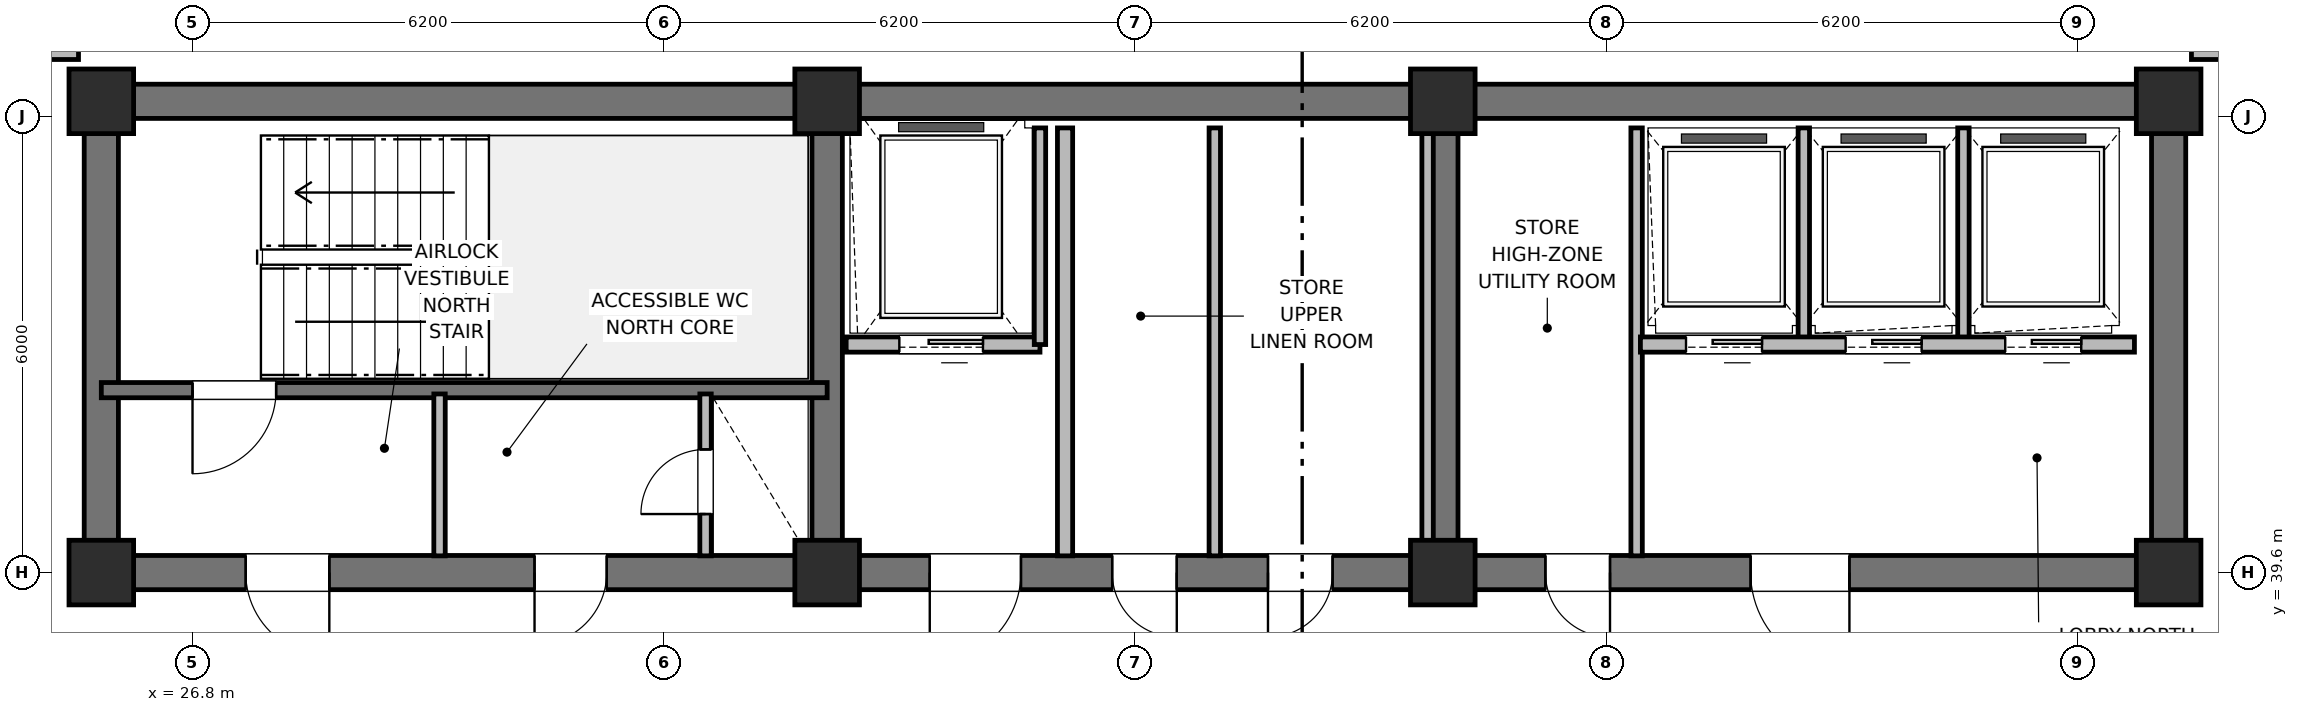
"""IFC4 building model, lengths in metres.
Left out: names, types, materials, properties, quantities, classifications, styles, units other than length and angle.
Written with IfcOpenShell. Run it as: python <this file> out.ifc"""

import sys

from ifc_helpers import new_model, si_unit, direction, frame, frame_2d, origin, origin_2d, place, context, subcontext, project, spatial, rectangle, extrude, element, fill, save


model = new_model("IFC4")
c1 = context("Model", 3, precision=1e-05, world=origin(), true_north=direction((0.0, 1.0)))
c2 = subcontext(c1, "Body", "Model", "MODEL_VIEW")
j1 = project(units=[si_unit("LENGTHUNIT", "METRE"), si_unit("PLANEANGLEUNIT", "RADIAN")], contexts=[c1])
p1 = place(None, origin())
s1 = spatial("IfcSite", under=j1, at=p1, CompositionType="ELEMENT")
p2 = place(p1, origin())
s2 = spatial("IfcBuilding", under=s1, at=p2, CompositionType="ELEMENT")
p3 = place(p2, frame((0.0, 0.0, 225.8)))
s3 = spatial("IfcBuildingStorey", under=s2, at=p3, CompositionType="ELEMENT", Elevation=225.8)
p4 = place(p3, frame((25.6, 45.8, 0.0), z_axis=(0.0, 0.0, 1.0), x_axis=(1.0, 0.0, 0.0)))
e1 = element("IfcWall", 1, at=p4, inside=s3, PredefinedType="SHEAR", context=c2, shape_type="SweptSolid", body=[
    extrude(rectangle(XDim=27.2, YDim=0.45, at=frame_2d((13.6, 0.0))), origin(), (0.0, 0.0, 1.0), 3.7),
])
for number, where, z_axis, x_axis in (
    (2, (25.6, 39.825, 0.0), (0.0, 0.0, 1.0), (0.0, 1.0, 0.0)),
    (3, (52.8, 39.825, 0.0), (0.0, 0.0, 1.0), (0.0, 1.0, 0.0)),
):
    element("IfcWall", number, at=place(p3, frame(where, z_axis=z_axis, x_axis=x_axis)), inside=s3, PredefinedType="SHEAR", context=c2, shape_type="SweptSolid", body=[
        extrude(rectangle(XDim=5.75, YDim=0.45, at=frame_2d((2.875, 0.0))), origin(), (0.0, 0.0, 1.0), 3.7),
    ])
p5 = place(p3, frame((52.8, 39.6, 0.0), z_axis=(0.0, 0.0, 1.0), x_axis=(-1.0, 0.0, 0.0)))
e4 = element("IfcWall", 4, at=p5, inside=s3, PredefinedType="SHEAR", context=c2, shape_type="SweptSolid", body=[
    extrude(rectangle(XDim=27.2, YDim=0.45, at=frame_2d((13.6, 0.0))), origin(), (0.0, 0.0, 1.0), 3.7),
])
p6 = place(p5, frame((24.2, 0.0, 0.0)))
e5 = element("IfcOpeningElement", 5, at=p6, cuts=e4, PredefinedType="OPENING", context=c2, shape_type="SweptSolid", body=[
    extrude(rectangle(XDim=1.1, YDim=2.15, at=frame_2d((0.55, 1.075))), frame((0.0, 0.235, 0.0), z_axis=(0.0, -1.0, 0.0), x_axis=(1.0, 0.0, 0.0)), (0.0, 0.0, 1.0), 0.47),
])
p7 = place(p5, frame((20.55, 0.0, 0.0)))
e6 = element("IfcOpeningElement", 6, at=p7, cuts=e4, PredefinedType="OPENING", context=c2, shape_type="SweptSolid", body=[
    extrude(rectangle(XDim=0.95, YDim=2.1, at=frame_2d((0.475, 1.05))), frame((0.0, 0.235, 0.0), z_axis=(0.0, -1.0, 0.0), x_axis=(1.0, 0.0, 0.0)), (0.0, 0.0, 1.0), 0.47),
])
p8 = place(p5, frame((15.1, 0.0, 0.0)))
e7 = element("IfcOpeningElement", 7, at=p8, cuts=e4, PredefinedType="OPENING", context=c2, shape_type="SweptSolid", body=[
    extrude(rectangle(XDim=1.2, YDim=2.15, at=frame_2d((0.6, 1.075))), frame((0.0, 0.235, 0.0), z_axis=(0.0, -1.0, 0.0), x_axis=(1.0, 0.0, 0.0)), (0.0, 0.0, 1.0), 0.47),
])
p9 = place(p5, frame((13.05, 0.0, 0.0)))
e8 = element("IfcOpeningElement", 8, at=p9, cuts=e4, PredefinedType="OPENING", context=c2, shape_type="SweptSolid", body=[
    extrude(rectangle(XDim=0.85, YDim=2.1, at=frame_2d((0.425, 1.05))), frame((0.0, 0.235, 0.0), z_axis=(0.0, -1.0, 0.0), x_axis=(1.0, 0.0, 0.0)), (0.0, 0.0, 1.0), 0.47),
])
p10 = place(p5, frame((11.0, 0.0, 0.0)))
e9 = element("IfcOpeningElement", 9, at=p10, cuts=e4, PredefinedType="OPENING", context=c2, shape_type="SweptSolid", body=[
    extrude(rectangle(XDim=0.85, YDim=2.1, at=frame_2d((0.425, 1.05))), frame((0.0, 0.235, 0.0), z_axis=(0.0, -1.0, 0.0), x_axis=(1.0, 0.0, 0.0)), (0.0, 0.0, 1.0), 0.47),
])
p11 = place(p5, frame((7.35, 0.0, 0.0)))
e10 = element("IfcOpeningElement", 10, at=p11, cuts=e4, PredefinedType="OPENING", context=c2, shape_type="SweptSolid", body=[
    extrude(rectangle(XDim=0.85, YDim=2.1, at=frame_2d((0.425, 1.05))), frame((0.0, 0.235, 0.0), z_axis=(0.0, -1.0, 0.0), x_axis=(1.0, 0.0, 0.0)), (0.0, 0.0, 1.0), 0.47),
])
p12 = place(p5, frame((4.2, 0.0, 0.0)))
e11 = element("IfcOpeningElement", 11, at=p12, cuts=e4, PredefinedType="OPENING", context=c2, shape_type="SweptSolid", body=[
    extrude(rectangle(XDim=1.3, YDim=2.2, at=frame_2d((0.65, 1.1))), frame((0.0, 0.235, 0.0), z_axis=(0.0, -1.0, 0.0), x_axis=(1.0, 0.0, 0.0)), (0.0, 0.0, 1.0), 0.47),
])
for number, where, z_axis, x_axis in (
    (12, (35.15, 39.825, 0.0), (0.0, 0.0, 1.0), (0.0, 1.0, 0.0)),
    (13, (43.25, 39.825, 0.0), (0.0, 0.0, 1.0), (0.0, 1.0, 0.0)),
):
    element("IfcWall", number, at=place(p3, frame(where, z_axis=z_axis, x_axis=x_axis)), inside=s3, PredefinedType="SHEAR", context=c2, shape_type="SweptSolid", body=[
        extrude(rectangle(XDim=5.75, YDim=0.4, at=frame_2d((2.875, 0.0))), origin(), (0.0, 0.0, 1.0), 3.7),
    ])
for number, where, z_axis, x_axis in (
    (14, (25.6, 39.6, 0.0), (0.0, 0.0, 1.0), (1.0, 0.0, 0.0)),
    (15, (25.6, 45.8, 0.0), (0.0, 0.0, 1.0), (1.0, 0.0, 0.0)),
    (16, (35.15, 39.6, 0.0), (0.0, 0.0, 1.0), (1.0, 0.0, 0.0)),
    (17, (35.15, 45.8, 0.0), (0.0, 0.0, 1.0), (1.0, 0.0, 0.0)),
    (18, (43.25, 39.6, 0.0), (0.0, 0.0, 1.0), (1.0, 0.0, 0.0)),
    (19, (43.25, 45.8, 0.0), (0.0, 0.0, 1.0), (1.0, 0.0, 0.0)),
    (20, (52.8, 39.6, 0.0), (0.0, 0.0, 1.0), (1.0, 0.0, 0.0)),
    (21, (52.8, 45.8, 0.0), (0.0, 0.0, 1.0), (1.0, 0.0, 0.0)),
):
    element("IfcColumn", number, at=place(p3, frame(where, z_axis=z_axis, x_axis=x_axis)), inside=s3, PredefinedType="COLUMN", context=c2, shape_type="SweptSolid", body=[
        extrude(rectangle(XDim=0.85, YDim=0.85, at=origin_2d()), origin(), (0.0, 0.0, 1.0), 3.7),
    ])
p13 = place(p3, frame((35.15, 42.0, 0.0), z_axis=(0.0, 0.0, 1.0), x_axis=(-1.0, 0.0, 0.0)))
e22 = element("IfcWall", 22, at=p13, inside=s3, PredefinedType="SHEAR", context=c2, shape_type="SweptSolid", body=[
    extrude(rectangle(XDim=9.55, YDim=0.2, at=frame_2d((4.775, 0.0))), origin(), (0.0, 0.0, 1.0), 3.7),
])
p14 = place(p13, frame((7.25, 0.0, 0.0)))
e23 = element("IfcOpeningElement", 23, at=p14, cuts=e22, PredefinedType="OPENING", context=c2, shape_type="SweptSolid", body=[
    extrude(rectangle(XDim=1.1, YDim=2.15, at=frame_2d((0.55, 1.075))), frame((0.0, 0.11, 0.0), z_axis=(0.0, -1.0, 0.0), x_axis=(1.0, 0.0, 0.0)), (0.0, 0.0, 1.0), 0.22),
])
p15 = place(p3, frame((33.55, 39.82, 0.0), z_axis=(0.0, 0.0, 1.0), x_axis=(0.0, 1.0, 0.0)))
e24 = element("IfcWall", 24, at=p15, inside=s3, PredefinedType="PARTITIONING", context=c2, shape_type="SweptSolid", body=[
    extrude(rectangle(XDim=2.13, YDim=0.15, at=frame_2d((1.065, 0.0))), origin(), (0.0, 0.0, 1.0), 2.56),
])
p16 = place(p15, frame((0.55, 0.0, 0.0)))
e25 = element("IfcOpeningElement", 25, at=p16, cuts=e24, PredefinedType="OPENING", context=c2, shape_type="SweptSolid", body=[
    extrude(rectangle(XDim=0.85, YDim=2.05, at=frame_2d((0.425, 1.025))), frame((0.0, 0.085, 0.0), z_axis=(0.0, -1.0, 0.0), x_axis=(1.0, 0.0, 0.0)), (0.0, 0.0, 1.0), 0.17),
])
p17 = place(p3, frame((30.05, 39.82, 0.0), z_axis=(0.0, 0.0, 1.0), x_axis=(0.0, 1.0, 0.0)))
e26 = element("IfcWall", 26, at=p17, inside=s3, PredefinedType="PARTITIONING", context=c2, shape_type="SweptSolid", body=[
    extrude(rectangle(XDim=2.13, YDim=0.15, at=frame_2d((1.065, 0.0))), origin(), (0.0, 0.0, 1.0), 2.56),
])
p18 = place(p3, frame((37.95, 42.6, 0.0), z_axis=(0.0, 0.0, 1.0), x_axis=(-1.0, 0.0, 0.0)))
e27 = element("IfcWall", 27, at=p18, inside=s3, PredefinedType="PARTITIONING", context=c2, shape_type="SweptSolid", body=[
    extrude(rectangle(XDim=2.55, YDim=0.2, at=frame_2d((1.275, 0.0))), origin(), (0.0, 0.0, 1.0), 2.33),
])
p19 = place(p18, frame((0.75, 0.0, 0.0)))
e28 = element("IfcOpeningElement", 28, at=p19, cuts=e27, PredefinedType="OPENING", context=c2, shape_type="SweptSolid", body=[
    extrude(rectangle(XDim=1.1, YDim=2.15, at=frame_2d((0.55, 1.075))), frame((0.0, 0.11, 0.0), z_axis=(0.0, -1.0, 0.0), x_axis=(1.0, 0.0, 0.0)), (0.0, 0.0, 1.0), 0.22),
])
p20 = place(p3, frame((37.95, 42.6, 0.0), z_axis=(0.0, 0.0, 1.0), x_axis=(0.0, 1.0, 0.0)))
e29 = element("IfcWall", 29, at=p20, inside=s3, PredefinedType="PARTITIONING", context=c2, shape_type="SweptSolid", body=[
    extrude(rectangle(XDim=2.85, YDim=0.15, at=frame_2d((1.425, 0.0))), origin(), (0.0, 0.0, 1.0), 2.56),
])
p21 = place(p3, frame((38.28, 39.82, 0.0), z_axis=(0.0, 0.0, 1.0), x_axis=(0.0, 1.0, 0.0)))
e30 = element("IfcWall", 30, at=p21, inside=s3, PredefinedType="PARTITIONING", context=c2, shape_type="SweptSolid", body=[
    extrude(rectangle(XDim=5.63, YDim=0.2, at=frame_2d((2.815, 0.0))), origin(), (0.0, 0.0, 1.0), 2.56),
])
for number, where, z_axis, x_axis in (
    (31, (43.05, 39.82, 0.0), (0.0, 0.0, 1.0), (0.0, 1.0, 0.0)),
    (32, (40.25, 39.82, 0.0), (0.0, 0.0, 1.0), (0.0, 1.0, 0.0)),
    (33, (45.8, 39.82, 0.0), (0.0, 0.0, 1.0), (0.0, 1.0, 0.0)),
):
    element("IfcWall", number, at=place(p3, frame(where, z_axis=z_axis, x_axis=x_axis)), inside=s3, PredefinedType="PARTITIONING", context=c2, shape_type="SweptSolid", body=[
        extrude(rectangle(XDim=5.63, YDim=0.15, at=frame_2d((2.815, 0.0))), origin(), (0.0, 0.0, 1.0), 2.56),
    ])
for number, where, z_axis, x_axis in (
    (34, (48.0, 42.65, 0.0), (0.0, 0.0, 1.0), (0.0, 1.0, 0.0)),
    (35, (50.1, 42.65, 0.0), (0.0, 0.0, 1.0), (0.0, 1.0, 0.0)),
):
    element("IfcWall", number, at=place(p3, frame(where, z_axis=z_axis, x_axis=x_axis)), inside=s3, PredefinedType="PARTITIONING", context=c2, shape_type="SweptSolid", body=[
        extrude(rectangle(XDim=2.8, YDim=0.15, at=frame_2d((1.4, 0.0))), origin(), (0.0, 0.0, 1.0), 2.56),
    ])
p22 = place(p3, frame((52.35, 42.6, 0.0), z_axis=(0.0, 0.0, 1.0), x_axis=(-1.0, 0.0, 0.0)))
e36 = element("IfcWall", 36, at=p22, inside=s3, PredefinedType="PARTITIONING", context=c2, shape_type="SweptSolid", body=[
    extrude(rectangle(XDim=6.5, YDim=0.2, at=frame_2d((3.25, 0.0))), origin(), (0.0, 0.0, 1.0), 2.56),
])
p23 = place(p22, frame((4.9, 0.0, 0.0)))
e37 = element("IfcOpeningElement", 37, at=p23, cuts=e36, PredefinedType="OPENING", context=c2, shape_type="SweptSolid", body=[
    extrude(rectangle(XDim=1.0, YDim=2.15, at=frame_2d((0.5, 1.075))), frame((0.0, 0.11, 0.0), z_axis=(0.0, -1.0, 0.0), x_axis=(1.0, 0.0, 0.0)), (0.0, 0.0, 1.0), 0.22),
])
p24 = place(p22, frame((2.8, 0.0, 0.0)))
e38 = element("IfcOpeningElement", 38, at=p24, cuts=e36, PredefinedType="OPENING", context=c2, shape_type="SweptSolid", body=[
    extrude(rectangle(XDim=1.0, YDim=2.15, at=frame_2d((0.5, 1.075))), frame((0.0, 0.11, 0.0), z_axis=(0.0, -1.0, 0.0), x_axis=(1.0, 0.0, 0.0)), (0.0, 0.0, 1.0), 0.22),
])
p25 = place(p22, frame((0.7, 0.0, 0.0)))
e39 = element("IfcOpeningElement", 39, at=p25, cuts=e36, PredefinedType="OPENING", context=c2, shape_type="SweptSolid", body=[
    extrude(rectangle(XDim=1.0, YDim=2.15, at=frame_2d((0.5, 1.075))), frame((0.0, 0.11, 0.0), z_axis=(0.0, -1.0, 0.0), x_axis=(1.0, 0.0, 0.0)), (0.0, 0.0, 1.0), 0.22),
])
p26 = place(p3, frame((21.546, 46.45, 0.0), z_axis=(0.0, 0.0, 1.0), x_axis=(1.0, 0.0, 0.0)))
e40 = element("IfcWall", 40, at=p26, inside=s3, PredefinedType="PARTITIONING", context=c2, shape_type="SweptSolid", body=[
    extrude(rectangle(XDim=3.754, YDim=0.2, at=frame_2d((1.877, 0.0))), origin(), (0.0, 0.0, 1.0), 2.56),
])
p27 = place(p3, frame((53.1, 46.45, 0.0), z_axis=(0.0, 0.0, 1.0), x_axis=(1.0, 0.0, 0.0)))
e41 = element("IfcWall", 41, at=p27, inside=s3, PredefinedType="PARTITIONING", context=c2, shape_type="SweptSolid", body=[
    extrude(rectangle(XDim=3.754, YDim=0.2, at=frame_2d((1.877, 0.0))), origin(), (0.0, 0.0, 1.0), 2.56),
])
p28 = place(p14, origin())
e42 = element("IfcDoor", 42, at=p28, inside=s3, OperationType="SINGLE_SWING_RIGHT", PredefinedType="DOOR", context=c2, shape_type="SweptSolid", body=[
    extrude(rectangle(XDim=1.1, YDim=2.15, at=frame_2d((0.55, 1.075))), frame((0.0, 0.025, 0.0), z_axis=(0.0, -1.0, 0.0), x_axis=(1.0, 0.0, 0.0)), (0.0, 0.0, 1.0), 0.05),
])
fill(e23, e42)
p29 = place(p16, origin())
e43 = element("IfcDoor", 43, at=p29, inside=s3, OperationType="SINGLE_SWING_LEFT", PredefinedType="TRAPDOOR", context=c2, shape_type="SweptSolid", body=[
    extrude(rectangle(XDim=0.85, YDim=2.05, at=frame_2d((0.425, 1.025))), frame((0.0, 0.025, 0.0), z_axis=(0.0, -1.0, 0.0), x_axis=(1.0, 0.0, 0.0)), (0.0, 0.0, 1.0), 0.05),
])
fill(e25, e43)
p30 = place(p19, origin())
e44 = element("IfcDoor", 44, at=p30, inside=s3, OperationType="SLIDING_TO_LEFT", PredefinedType="DOOR", context=c2, shape_type="SweptSolid", body=[
    extrude(rectangle(XDim=1.1, YDim=2.15, at=frame_2d((0.55, 1.075))), frame((0.0, 0.025, 0.0), z_axis=(0.0, -1.0, 0.0), x_axis=(1.0, 0.0, 0.0)), (0.0, 0.0, 1.0), 0.05),
])
fill(e28, e44)
p31 = place(p23, origin())
e45 = element("IfcDoor", 45, at=p31, inside=s3, OperationType="SLIDING_TO_LEFT", PredefinedType="DOOR", context=c2, shape_type="SweptSolid", body=[
    extrude(rectangle(XDim=1.0, YDim=2.15, at=frame_2d((0.5, 1.075))), frame((0.0, 0.025, 0.0), z_axis=(0.0, -1.0, 0.0), x_axis=(1.0, 0.0, 0.0)), (0.0, 0.0, 1.0), 0.05),
])
fill(e37, e45)
p32 = place(p24, origin())
e46 = element("IfcDoor", 46, at=p32, inside=s3, OperationType="SLIDING_TO_LEFT", PredefinedType="DOOR", context=c2, shape_type="SweptSolid", body=[
    extrude(rectangle(XDim=1.0, YDim=2.15, at=frame_2d((0.5, 1.075))), frame((0.0, 0.025, 0.0), z_axis=(0.0, -1.0, 0.0), x_axis=(1.0, 0.0, 0.0)), (0.0, 0.0, 1.0), 0.05),
])
fill(e38, e46)
p33 = place(p25, origin())
e47 = element("IfcDoor", 47, at=p33, inside=s3, OperationType="SLIDING_TO_LEFT", PredefinedType="DOOR", context=c2, shape_type="SweptSolid", body=[
    extrude(rectangle(XDim=1.0, YDim=2.15, at=frame_2d((0.5, 1.075))), frame((0.0, 0.025, 0.0), z_axis=(0.0, -1.0, 0.0), x_axis=(1.0, 0.0, 0.0)), (0.0, 0.0, 1.0), 0.05),
])
fill(e39, e47)
p34 = place(p6, origin())
e48 = element("IfcDoor", 48, at=p34, inside=s3, OperationType="SINGLE_SWING_LEFT", PredefinedType="DOOR", context=c2, shape_type="SweptSolid", body=[
    extrude(rectangle(XDim=1.1, YDim=2.15, at=frame_2d((0.55, 1.075))), frame((0.0, 0.025, 0.0), z_axis=(0.0, -1.0, 0.0), x_axis=(1.0, 0.0, 0.0)), (0.0, 0.0, 1.0), 0.05),
])
fill(e5, e48)
p35 = place(p7, origin())
e49 = element("IfcDoor", 49, at=p35, inside=s3, OperationType="SINGLE_SWING_RIGHT", PredefinedType="DOOR", context=c2, shape_type="SweptSolid", body=[
    extrude(rectangle(XDim=0.95, YDim=2.1, at=frame_2d((0.475, 1.05))), frame((0.0, 0.025, 0.0), z_axis=(0.0, -1.0, 0.0), x_axis=(1.0, 0.0, 0.0)), (0.0, 0.0, 1.0), 0.05),
])
fill(e6, e49)
p36 = place(p8, origin())
e50 = element("IfcDoor", 50, at=p36, inside=s3, OperationType="SINGLE_SWING_RIGHT", PredefinedType="DOOR", context=c2, shape_type="SweptSolid", body=[
    extrude(rectangle(XDim=1.2, YDim=2.15, at=frame_2d((0.6, 1.075))), frame((0.0, 0.025, 0.0), z_axis=(0.0, -1.0, 0.0), x_axis=(1.0, 0.0, 0.0)), (0.0, 0.0, 1.0), 0.05),
])
fill(e7, e50)
p37 = place(p9, origin())
e51 = element("IfcDoor", 51, at=p37, inside=s3, OperationType="SINGLE_SWING_LEFT", PredefinedType="DOOR", context=c2, shape_type="SweptSolid", body=[
    extrude(rectangle(XDim=0.85, YDim=2.1, at=frame_2d((0.425, 1.05))), frame((0.0, 0.025, 0.0), z_axis=(0.0, -1.0, 0.0), x_axis=(1.0, 0.0, 0.0)), (0.0, 0.0, 1.0), 0.05),
])
fill(e8, e51)
p38 = place(p10, origin())
e52 = element("IfcDoor", 52, at=p38, inside=s3, OperationType="SINGLE_SWING_RIGHT", PredefinedType="DOOR", context=c2, shape_type="SweptSolid", body=[
    extrude(rectangle(XDim=0.85, YDim=2.1, at=frame_2d((0.425, 1.05))), frame((0.0, 0.025, 0.0), z_axis=(0.0, -1.0, 0.0), x_axis=(1.0, 0.0, 0.0)), (0.0, 0.0, 1.0), 0.05),
])
fill(e9, e52)
p39 = place(p11, origin())
e53 = element("IfcDoor", 53, at=p39, inside=s3, OperationType="SINGLE_SWING_LEFT", PredefinedType="DOOR", context=c2, shape_type="SweptSolid", body=[
    extrude(rectangle(XDim=0.85, YDim=2.1, at=frame_2d((0.425, 1.05))), frame((0.0, 0.025, 0.0), z_axis=(0.0, -1.0, 0.0), x_axis=(1.0, 0.0, 0.0)), (0.0, 0.0, 1.0), 0.05),
])
fill(e10, e53)
p40 = place(p12, origin())
e54 = element("IfcDoor", 54, at=p40, inside=s3, OperationType="SINGLE_SWING_LEFT", PredefinedType="DOOR", context=c2, shape_type="SweptSolid", body=[
    extrude(rectangle(XDim=1.3, YDim=2.2, at=frame_2d((0.65, 1.1))), frame((0.0, 0.025, 0.0), z_axis=(0.0, -1.0, 0.0), x_axis=(1.0, 0.0, 0.0)), (0.0, 0.0, 1.0), 0.05),
])
fill(e11, e54)
save(model, sys.argv[1])
